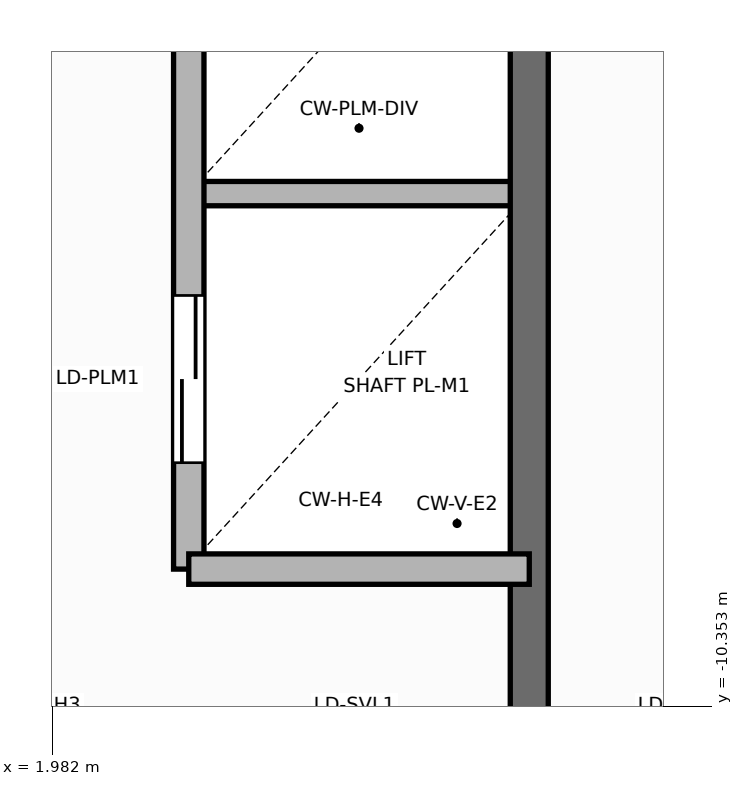
"""IFC4 building model, lengths in metres.
Left out: names, types, materials, properties, quantities, classifications, styles, units other than length and angle.
Written with IfcOpenShell. Run it as: python <this file> out.ifc"""

import sys

from ifc_helpers import new_model, si_unit, direction, frame, frame_2d, origin, place, context, subcontext, project, spatial, rectangle, extrude, element, fill, save


model = new_model("IFC4")
c1 = context("Model", 3, precision=1e-05, world=origin(), true_north=direction((0.0, 1.0)))
c2 = subcontext(c1, "Body", "Model", "MODEL_VIEW")
j1 = project(units=[si_unit("LENGTHUNIT", "METRE"), si_unit("PLANEANGLEUNIT", "RADIAN")], contexts=[c1])
p1 = place(None, origin())
s1 = spatial("IfcSite", under=j1, at=p1, CompositionType="ELEMENT")
p2 = place(p1, origin())
s2 = spatial("IfcBuilding", under=s1, at=p2, CompositionType="ELEMENT")
p3 = place(p2, frame((0.0, 0.0, 168.9)))
s3 = spatial("IfcBuildingStorey", under=s2, at=p3, CompositionType="ELEMENT", Elevation=168.9)
p4 = place(p3, frame((22.812, -10.495, -0.2), z_axis=(0.0, 0.0, 1.0), x_axis=(-0.593788907914, 0.804620862791, 0.0)))
e1 = element("IfcWall", 1, at=p4, inside=s3, PredefinedType="PARAPET", context=c2, shape_type="SweptSolid", body=[
    extrude(rectangle(XDim=30.276, YDim=0.36, at=frame_2d((15.138, 0.0))), origin(), (0.0, 0.0, 1.0), 0.38),
])
p5 = place(p3, frame((2.88, -6.98, 0.0), z_axis=(0.0, 0.0, 1.0), x_axis=(1.0, 0.0, 0.0)))
e2 = element("IfcWall", 2, at=p5, inside=s3, PredefinedType="PARTITIONING", context=c2, shape_type="SweptSolid", body=[
    extrude(rectangle(XDim=2.24, YDim=0.16, at=frame_2d((1.12, 0.0))), origin(), (0.0, 0.0, 1.0), 4.52),
])
p6 = place(p3, frame((5.12, -13.85, 0.0), z_axis=(0.0, 0.0, 1.0), x_axis=(0.0, 1.0, 0.0)))
e3 = element("IfcWall", 3, at=p6, inside=s3, PredefinedType="SHEAR", context=c2, shape_type="SweptSolid", body=[
    extrude(rectangle(XDim=9.4, YDim=0.25, at=frame_2d((4.7, 0.0))), origin(), (0.0, 0.0, 1.0), 4.8),
])
p7 = place(p3, frame((2.88, -9.45, 0.0), z_axis=(0.0, 0.0, 1.0), x_axis=(0.0, 1.0, 0.0)))
e4 = element("IfcWall", 4, at=p7, inside=s3, PredefinedType="SOLIDWALL", context=c2, shape_type="SweptSolid", body=[
    extrude(rectangle(XDim=5.0, YDim=0.2, at=frame_2d((2.5, 0.0))), origin(), (0.0, 0.0, 1.0), 4.52),
])
p8 = place(p7, frame((0.7, 0.0, 0.0)))
e5 = element("IfcOpeningElement", 5, at=p8, cuts=e4, PredefinedType="OPENING", context=c2, shape_type="SweptSolid", body=[
    extrude(rectangle(XDim=1.106, YDim=2.104, at=frame_2d((0.55, 1.052))), frame((0.0, 0.11, 0.0), z_axis=(0.0, -1.0, 0.0), x_axis=(1.0, 0.0, 0.0)), (0.0, 0.0, 1.0), 0.22),
])
p9 = place(p3, frame((2.88, -9.45, 0.0), z_axis=(0.0, 0.0, 1.0), x_axis=(1.0, 0.0, 0.0)))
e6 = element("IfcWall", 6, at=p9, inside=s3, PredefinedType="SOLIDWALL", context=c2, shape_type="SweptSolid", body=[
    extrude(rectangle(XDim=2.24, YDim=0.2, at=frame_2d((1.12, 0.0))), origin(), (0.0, 0.0, 1.0), 4.52),
])
p10 = place(p8, origin())
e7 = element("IfcDoor", 7, at=p10, inside=s3, OperationType="DOUBLE_DOOR_SLIDING", PredefinedType="DOOR", context=c2, shape_type="SweptSolid", body=[
    extrude(rectangle(XDim=1.1, YDim=2.1, at=frame_2d((0.55, 1.05))), frame((0.0, 0.025, 0.0), z_axis=(0.0, -1.0, 0.0), x_axis=(1.0, 0.0, 0.0)), (0.0, 0.0, 1.0), 0.05),
])
fill(e5, e7)
save(model, sys.argv[1])
